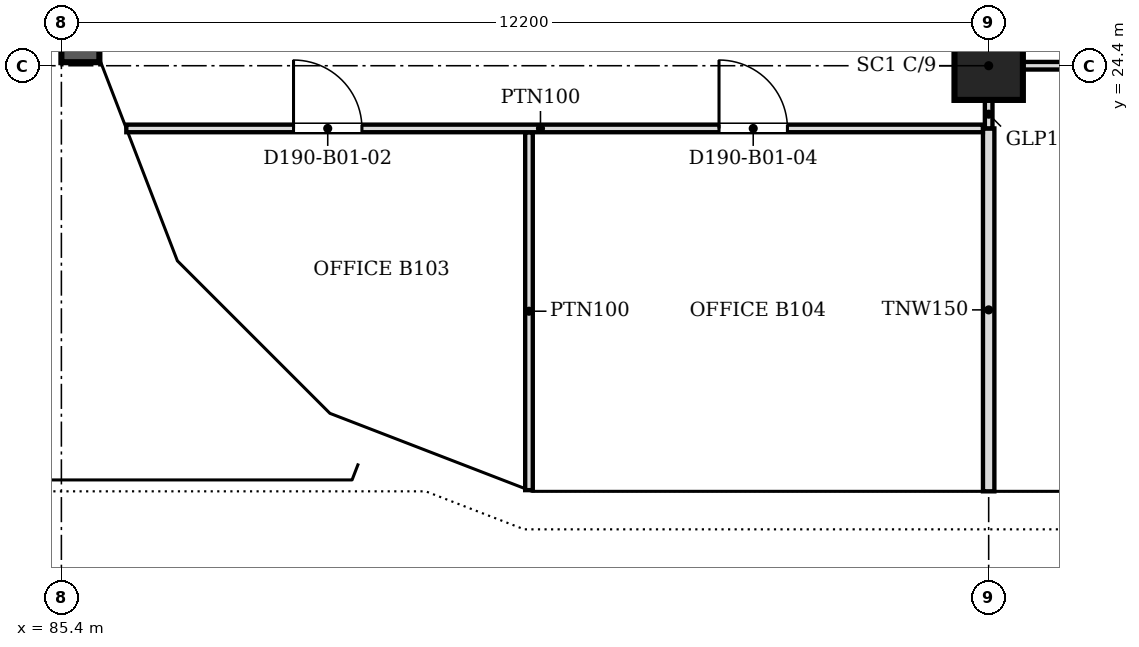
"""IFC4 building model, lengths in metres.
Left out: names, types, materials, properties, quantities, classifications, styles, units other than length and angle.
Written with IfcOpenShell. Run it as: python <this file> out.ifc"""

import sys

from ifc_helpers import new_model, si_unit, direction, frame, frame_2d, origin, origin_2d, place, context, subcontext, project, spatial, polyline, rectangle, outline, extrude, faceted_brep, source, transform, mapped, element, fill, save


model = new_model("IFC4")
c1 = context("Model", 3, precision=1e-05, world=origin(), true_north=direction((0.0, 1.0)))
c2 = subcontext(c1, "Body", "Model", "MODEL_VIEW")
j1 = project(units=[si_unit("LENGTHUNIT", "METRE"), si_unit("PLANEANGLEUNIT", "RADIAN")], contexts=[c1])
p1 = place(None, origin())
s1 = spatial("IfcSite", under=j1, at=p1, CompositionType="ELEMENT")
p2 = place(p1, origin())
s2 = spatial("IfcBuilding", under=s1, at=p2, CompositionType="ELEMENT")
p3 = place(p2, frame((0.0, 0.0, 16.8)))
s3 = spatial("IfcBuildingStorey", under=s2, at=p3, CompositionType="ELEMENT", Elevation=16.8)
p4 = place(p3, frame((97.6, 24.4, 0.0), z_axis=(0.0, 0.0, 1.0), x_axis=(1.0, 0.0, 0.0)))
e1 = element("IfcColumn", 1, at=p4, inside=s3, PredefinedType="COLUMN", context=c2, shape_type="SweptSolid", body=[
    extrude(rectangle(XDim=0.9, YDim=0.9, at=origin_2d()), origin(), (0.0, 0.0, 1.0), 4.3),
])
m1 = source(origin(), c2, "Body", "Brep", [
    faceted_brep([(3.05, -0.25, 0.0), (0.047, -0.25, 4.5), (0.0, -0.25, 4.429), (0.0, -0.25, 0.0), (0.093, 0.25, 4.43), (3.05, 0.25, 0.0), (0.093, 0.25, 0.0), (0.047, 0.0, 4.5)], [[[0, 1, 2, 3]], [[4, 5, 6]], [[5, 4, 7, 1, 0]], [[2, 1, 7]], [[6, 5, 0, 3]], [[6, 3, 2, 7, 4]]]),
])
p5 = place(p3, frame((91.5, 18.55, 0.0), z_axis=(0.0, 0.0, 1.0), x_axis=(1.0, 0.0, 0.0)))
e2 = element("IfcWall", 2, at=p5, inside=s3, PredefinedType="SOLIDWALL", context=c2, shape_type="MappedRepresentation", body=[
    mapped(m1, transform((0.0, 0.0, 0.0), scale=1.0)),
])
m2 = source(origin(), c2, "Body", "SweptSolid", [
    extrude(outline(polyline([(2.583, 0.25), (0.247, 3.75), (0.247, 0.25), (2.583, 0.25)])), frame((0.0, 0.26, 0.0), z_axis=(0.0, -1.0, 0.0), x_axis=(1.0, 0.0, 0.0)), (0.0, 0.0, 1.0), 0.52),
])
p6 = place(p5, origin())
e3 = element("IfcOpeningElement", 3, at=p6, cuts=e2, PredefinedType="OPENING", context=c2, shape_type="MappedRepresentation", body=[
    mapped(m2, transform((0.0, 0.0, 0.0), scale=1.0)),
])
m3 = source(origin(), c2, "Body", "Brep", [
    faceted_brep([(2.997, -0.25, 4.43), (2.95, -0.25, 4.5), (0.0, -0.25, 0.0), (2.997, -0.25, 0.0), (0.053, 0.25, 0.081), (2.904, 0.25, 4.429), (2.904, 0.25, 0.0), (0.053, 0.25, 0.0), (2.95, 0.0, 4.5), (0.0, 0.0, 0.0)], [[[0, 1, 2, 3]], [[4, 5, 6, 7]], [[8, 1, 0]], [[5, 4, 9, 2, 1, 8]], [[7, 6, 3, 2, 9]], [[7, 9, 4]], [[3, 6, 5, 8, 0]]]),
])
p7 = place(p3, frame((88.794, 19.612, 0.0), z_axis=(0.0, 0.0, 1.0), x_axis=(0.933000876937, -0.359874094142, 0.0)))
e4 = element("IfcWall", 4, at=p7, inside=s3, PredefinedType="SOLIDWALL", context=c2, shape_type="MappedRepresentation", body=[
    mapped(m3, transform((0.0, 0.0, 0.0), scale=1.0)),
])
m4 = source(origin(), c2, "Body", "SweptSolid", [
    extrude(outline(polyline([(2.75, 3.739), (0.463, 0.25), (2.75, 0.25), (2.75, 3.739)])), frame((0.0, 0.26, 0.0), z_axis=(0.0, -1.0, 0.0), x_axis=(1.0, 0.0, 0.0)), (0.0, 0.0, 1.0), 0.52),
])
p8 = place(p7, origin())
e5 = element("IfcOpeningElement", 5, at=p8, cuts=e4, PredefinedType="OPENING", context=c2, shape_type="MappedRepresentation", body=[
    mapped(m4, transform((0.0, 0.0, 0.0), scale=1.0)),
])
m5 = source(origin(), c2, "Body", "Brep", [
    faceted_brep([(6.1, -0.25, 0.0), (3.05, -0.25, 4.5), (0.0, -0.25, 0.0), (6.1, -0.25, 0.0), (0.0, 0.25, 0.0), (3.05, 0.25, 4.5), (6.1, 0.25, 0.0), (6.1, 0.25, 0.0)], [[[0, 1, 2, 3]], [[4, 5, 6, 7]], [[6, 5, 1, 0]], [[5, 4, 2, 1]], [[4, 7, 3, 2]], [[3, 7, 6, 0]]]),
])
p9 = place(p3, frame((94.55, 18.55, 0.0), z_axis=(0.0, 0.0, 1.0), x_axis=(1.0, 0.0, 0.0)))
e6 = element("IfcWall", 6, at=p9, inside=s3, PredefinedType="SOLIDWALL", context=c2, shape_type="MappedRepresentation", body=[
    mapped(m5, transform((0.0, 0.0, 0.0), scale=1.0)),
])
m6 = source(origin(), c2, "Body", "SweptSolid", [
    extrude(outline(polyline([(5.629, 0.25), (3.05, 4.054), (0.471, 0.25), (5.629, 0.25)])), frame((0.0, 0.26, 0.0), z_axis=(0.0, -1.0, 0.0), x_axis=(1.0, 0.0, 0.0)), (0.0, 0.0, 1.0), 0.52),
])
p10 = place(p9, origin())
e7 = element("IfcOpeningElement", 7, at=p10, cuts=e6, PredefinedType="OPENING", context=c2, shape_type="MappedRepresentation", body=[
    mapped(m6, transform((0.0, 0.0, 0.0), scale=1.0)),
])
m7 = source(origin(), c2, "Body", "Brep", [
    faceted_brep([(6.053, -0.25, 0.0), (3.05, -0.25, 4.5), (0.0, -0.25, 0.0), (0.0, 0.25, 0.0), (3.05, 0.25, 4.5), (6.007, 0.25, 0.07), (6.007, 0.25, 0.0), (6.053, 0.0, 0.0)], [[[0, 1, 2]], [[3, 4, 5, 6]], [[5, 4, 1, 0, 7]], [[4, 3, 2, 1]], [[3, 6, 7, 0, 2]], [[7, 6, 5]]]),
])
p11 = place(p3, frame((85.65, 30.5, 0.0), z_axis=(0.0, 0.0, 1.0), x_axis=(0.0, -1.0, 0.0)))
e8 = element("IfcWall", 8, at=p11, inside=s3, PredefinedType="SOLIDWALL", context=c2, shape_type="MappedRepresentation", body=[
    mapped(m7, transform((0.0, 0.0, 0.0), scale=1.0)),
])
m8 = source(origin(), c2, "Body", "SweptSolid", [
    extrude(rectangle(XDim=1.8, YDim=2.4, at=frame_2d((0.9, 1.2))), frame((0.0, 0.26, 0.0), z_axis=(0.0, -1.0, 0.0), x_axis=(1.0, 0.0, 0.0)), (0.0, 0.0, 1.0), 0.52),
])
p12 = place(p11, frame((2.15, 0.0, 0.0)))
e9 = element("IfcOpeningElement", 9, at=p12, cuts=e8, PredefinedType="OPENING", context=c2, shape_type="MappedRepresentation", body=[
    mapped(m8, transform((0.0, 0.0, 0.0), scale=1.0)),
])
m9 = source(origin(), c2, "Body", "Brep", [
    faceted_brep([(3.003, -0.25, 4.419), (2.95, -0.25, 4.5), (0.0, -0.25, 0.0), (3.003, -0.25, 0.0), (0.047, 0.25, 0.071), (2.898, 0.25, 4.419), (2.898, 0.25, 0.0), (0.047, 0.25, 0.0), (2.95, 0.0, 4.5), (0.0, 0.0, 0.0)], [[[0, 1, 2, 3]], [[4, 5, 6, 7]], [[8, 1, 0]], [[5, 4, 9, 2, 1, 8]], [[7, 6, 3, 2, 9]], [[7, 9, 4]], [[3, 6, 5, 8, 0]]]),
])
p13 = place(p3, frame((85.65, 24.447, 0.0), z_axis=(0.0, 0.0, 1.0), x_axis=(0.35992665181, -0.932980602862, 0.0)))
e10 = element("IfcWall", 10, at=p13, inside=s3, PredefinedType="SOLIDWALL", context=c2, shape_type="MappedRepresentation", body=[
    mapped(m9, transform((0.0, 0.0, 0.0), scale=1.0)),
])
p14 = place(p13, origin())
e11 = element("IfcOpeningElement", 11, at=p14, cuts=e10, PredefinedType="OPENING", context=c2, shape_type="MappedRepresentation", body=[
    mapped(m4, transform((0.0, 0.0, 0.0), scale=1.0)),
])
m10 = source(origin(), c2, "Body", "Brep", [
    faceted_brep([(2.997, -0.25, 0.0), (0.053, -0.25, 4.5), (0.0, -0.25, 4.419), (0.0, -0.25, 0.0), (0.106, 0.25, 4.419), (2.944, 0.25, 0.081), (2.944, 0.25, 0.0), (0.106, 0.25, 0.0), (0.053, 0.0, 4.5), (2.997, 0.0, 0.0)], [[[0, 1, 2, 3]], [[4, 5, 6, 7]], [[5, 4, 8, 1, 0, 9]], [[2, 1, 8]], [[7, 6, 9, 0, 3]], [[7, 3, 2, 8, 4]], [[9, 6, 5]]]),
])
p15 = place(p3, frame((86.675, 21.731, 0.0), z_axis=(0.0, 0.0, 1.0), x_axis=(0.707106781187, -0.707106781187, 0.0)))
e12 = element("IfcWall", 12, at=p15, inside=s3, PredefinedType="SOLIDWALL", context=c2, shape_type="MappedRepresentation", body=[
    mapped(m10, transform((0.0, 0.0, 0.0), scale=1.0)),
])
m11 = source(origin(), c2, "Body", "SweptSolid", [
    extrude(outline(polyline([(2.535, 0.25), (0.253, 3.738), (0.253, 0.25), (2.535, 0.25)])), frame((0.0, 0.26, 0.0), z_axis=(0.0, -1.0, 0.0), x_axis=(1.0, 0.0, 0.0)), (0.0, 0.0, 1.0), 0.52),
])
p16 = place(p15, origin())
e13 = element("IfcOpeningElement", 13, at=p16, cuts=e12, PredefinedType="OPENING", context=c2, shape_type="MappedRepresentation", body=[
    mapped(m11, transform((0.0, 0.0, 0.0), scale=1.0)),
])
p17 = place(p2, frame((0.0, 0.0, 21.3)))
s4 = spatial("IfcBuildingStorey", under=s2, at=p17, CompositionType="ELEMENT", Elevation=21.3)
m12 = source(origin(), c2, "Body", "Brep", [
    faceted_brep([(3.003, -0.25, 0.0), (6.053, -0.25, 4.5), (3.003, -0.25, 9.0), (0.0, -0.25, 4.5), (0.047, 0.25, 4.57), (3.003, 0.25, 9.0), (6.053, 0.25, 4.5), (3.003, 0.25, 0.0), (0.047, 0.25, 4.43), (0.0, 0.0, 4.5)], [[[0, 1, 2, 3]], [[4, 5, 6, 7, 8]], [[7, 6, 1, 0]], [[6, 5, 2, 1]], [[5, 4, 9, 3, 2]], [[8, 7, 0, 3, 9]], [[8, 9, 4]]]),
])
p18 = place(p17, frame((91.547, 18.55, -4.5), z_axis=(0.0, 0.0, 1.0), x_axis=(1.0, 0.0, 0.0)))
e14 = element("IfcWall", 14, at=p18, inside=s4, PredefinedType="SOLIDWALL", context=c2, shape_type="MappedRepresentation", body=[
    mapped(m12, transform((0.0, 0.0, 0.0), scale=1.0)),
])
m13 = source(origin(), c2, "Body", "SweptSolid", [
    extrude(outline(polyline([(3.005, 0.448), (5.751, 4.5), (3.005, 8.552), (0.301, 4.5), (3.005, 0.448)])), frame((0.0, 0.26, 0.0), z_axis=(0.0, -1.0, 0.0), x_axis=(1.0, 0.0, 0.0)), (0.0, 0.0, 1.0), 0.52),
])
p19 = place(p18, origin())
e15 = element("IfcOpeningElement", 15, at=p19, cuts=e14, PredefinedType="OPENING", context=c2, shape_type="MappedRepresentation", body=[
    mapped(m13, transform((0.0, 0.0, 0.0), scale=1.0)),
])
m14 = source(origin(), c2, "Body", "Brep", [
    faceted_brep([(3.05, -0.25, 0.0), (6.1, -0.25, 4.5), (6.1, -0.25, 4.5), (3.05, -0.25, 9.0), (0.0, -0.25, 4.5), (0.0, 0.25, 4.5), (3.05, 0.25, 9.0), (6.1, 0.25, 4.5), (6.1, 0.25, 4.5), (3.05, 0.25, 0.0)], [[[0, 1, 2, 3, 4]], [[5, 6, 7, 8, 9]], [[9, 8, 1, 0]], [[7, 6, 3, 2]], [[6, 5, 4, 3]], [[5, 9, 0, 4]], [[1, 8, 7, 2]]]),
])
p20 = place(p17, frame((97.6, 18.55, -4.5), z_axis=(0.0, 0.0, 1.0), x_axis=(1.0, 0.0, 0.0)))
e16 = element("IfcWall", 16, at=p20, inside=s4, PredefinedType="SOLIDWALL", context=c2, shape_type="MappedRepresentation", body=[
    mapped(m14, transform((0.0, 0.0, 0.0), scale=1.0)),
])
m15 = source(origin(), c2, "Body", "SweptSolid", [
    extrude(outline(polyline([(3.05, 0.446), (5.798, 4.5), (3.05, 8.554), (0.302, 4.5), (3.05, 0.446)])), frame((0.0, 0.26, 0.0), z_axis=(0.0, -1.0, 0.0), x_axis=(1.0, 0.0, 0.0)), (0.0, 0.0, 1.0), 0.52),
])
p21 = place(p20, origin())
e17 = element("IfcOpeningElement", 17, at=p21, cuts=e16, PredefinedType="OPENING", context=c2, shape_type="MappedRepresentation", body=[
    mapped(m15, transform((0.0, 0.0, 0.0), scale=1.0)),
])
m16 = source(origin(), c2, "Body", "Brep", [
    faceted_brep([(1.753, -0.25, 0.0), (1.8, -0.25, 0.071), (1.8, -0.25, 8.929), (1.753, -0.25, 9.0), (0.0, -0.25, 6.373), (0.0, -0.25, 2.627), (0.0, 0.25, 2.627), (0.0, 0.25, 6.373), (1.707, 0.25, 8.93), (1.707, 0.25, 0.07), (1.753, 0.0, 0.0), (1.753, 0.0, 9.0)], [[[0, 1, 2, 3, 4, 5]], [[6, 7, 8, 9]], [[1, 0, 10]], [[11, 3, 2]], [[8, 7, 4, 3, 11]], [[7, 6, 5, 4]], [[6, 9, 10, 0, 5]], [[1, 10, 9, 8, 11, 2]]]),
])
p22 = place(p17, frame((85.65, 26.2, -4.5), z_axis=(0.0, 0.0, 1.0), x_axis=(0.0, -1.0, 0.0)))
e18 = element("IfcWall", 18, at=p22, inside=s4, PredefinedType="SOLIDWALL", context=c2, shape_type="MappedRepresentation", body=[
    mapped(m16, transform((0.0, 0.0, 0.0), scale=1.0)),
])
m17 = source(origin(), c2, "Body", "SweptSolid", [
    extrude(outline(polyline([(1.553, 8.25), (0.0, 5.922), (0.0, 3.077), (1.553, 0.75), (1.553, 8.25)])), frame((0.0, 0.26, 0.0), z_axis=(0.0, -1.0, 0.0), x_axis=(1.0, 0.0, 0.0)), (0.0, 0.0, 1.0), 0.52),
])
p23 = place(p22, origin())
e19 = element("IfcOpeningElement", 19, at=p23, cuts=e18, PredefinedType="OPENING", context=c2, shape_type="MappedRepresentation", body=[
    mapped(m17, transform((0.0, 0.0, 0.0), scale=1.0)),
])
m18 = source(origin(), c2, "Body", "Brep", [
    faceted_brep([(0.047, -0.25, 0.0), (2.997, -0.25, 4.5), (0.047, -0.25, 9.0), (0.0, -0.25, 8.93), (0.0, -0.25, 0.07), (0.093, 0.25, 8.929), (2.944, 0.25, 4.581), (2.944, 0.25, 4.419), (0.093, 0.25, 0.071), (2.997, 0.0, 4.5), (0.047, 0.0, 0.0), (0.047, 0.0, 9.0)], [[[0, 1, 2, 3, 4]], [[5, 6, 7, 8]], [[8, 7, 9, 1, 0, 10]], [[6, 5, 11, 2, 1, 9]], [[3, 2, 11]], [[10, 0, 4]], [[8, 10, 4, 3, 11, 5]], [[9, 7, 6]]]),
])
p24 = place(p17, frame((85.633, 24.49, -4.5), z_axis=(0.0, 0.0, 1.0), x_axis=(0.359901446078, -0.932990326376, 0.0)))
e20 = element("IfcWall", 20, at=p24, inside=s4, PredefinedType="SOLIDWALL", context=c2, shape_type="MappedRepresentation", body=[
    mapped(m18, transform((0.0, 0.0, 0.0), scale=1.0)),
])
m19 = source(origin(), c2, "Body", "SweptSolid", [
    extrude(outline(polyline([(0.247, 0.761), (2.698, 4.5), (0.247, 8.239), (0.247, 0.761)])), frame((0.0, 0.26, 0.0), z_axis=(0.0, -1.0, 0.0), x_axis=(1.0, 0.0, 0.0)), (0.0, 0.0, 1.0), 0.52),
])
p25 = place(p24, origin())
e21 = element("IfcOpeningElement", 21, at=p25, cuts=e20, PredefinedType="OPENING", context=c2, shape_type="MappedRepresentation", body=[
    mapped(m19, transform((0.0, 0.0, 0.0), scale=1.0)),
])
m20 = source(origin(), c2, "Body", "Brep", [
    faceted_brep([(2.944, -0.25, 0.0), (2.997, -0.25, 0.081), (2.997, -0.25, 8.919), (2.944, -0.25, 9.0), (0.0, -0.25, 4.5), (0.053, 0.25, 4.581), (2.891, 0.25, 8.919), (2.891, 0.25, 0.081), (0.053, 0.25, 4.419), (2.944, 0.0, 0.0), (2.944, 0.0, 9.0), (0.0, 0.0, 4.5)], [[[0, 1, 2, 3, 4]], [[5, 6, 7, 8]], [[1, 0, 9]], [[10, 3, 2]], [[6, 5, 11, 4, 3, 10]], [[8, 7, 9, 0, 4, 11]], [[8, 11, 5]], [[1, 9, 7, 6, 10, 2]]]),
])
p26 = place(p17, frame((86.712, 21.694, -4.5), z_axis=(0.0, 0.0, 1.0), x_axis=(0.707066050402, -0.707147509625, 0.0)))
e22 = element("IfcWall", 22, at=p26, inside=s4, PredefinedType="SOLIDWALL", context=c2, shape_type="MappedRepresentation", body=[
    mapped(m20, transform((0.0, 0.0, 0.0), scale=1.0)),
])
m21 = source(origin(), c2, "Body", "SweptSolid", [
    extrude(outline(polyline([(2.744, 8.238), (0.299, 4.5), (2.744, 0.762), (2.744, 8.238)])), frame((0.0, 0.26, 0.0), z_axis=(0.0, -1.0, 0.0), x_axis=(1.0, 0.0, 0.0)), (0.0, 0.0, 1.0), 0.52),
])
p27 = place(p26, origin())
e23 = element("IfcOpeningElement", 23, at=p27, cuts=e22, PredefinedType="OPENING", context=c2, shape_type="MappedRepresentation", body=[
    mapped(m21, transform((0.0, 0.0, 0.0), scale=1.0)),
])
m22 = source(origin(), c2, "Body", "Brep", [
    faceted_brep([(0.053, -0.25, 0.0), (3.003, -0.25, 4.5), (0.053, -0.25, 9.0), (0.0, -0.25, 8.919), (0.0, -0.25, 0.081), (0.106, 0.25, 8.919), (2.957, 0.25, 4.571), (2.957, 0.25, 4.429), (0.106, 0.25, 0.081), (3.003, 0.0, 4.5), (0.053, 0.0, 0.0), (0.053, 0.0, 9.0)], [[[0, 1, 2, 3, 4]], [[5, 6, 7, 8]], [[8, 7, 9, 1, 0, 10]], [[6, 5, 11, 2, 1, 9]], [[3, 2, 11]], [[10, 0, 4]], [[8, 10, 4, 3, 11, 5]], [[9, 7, 6]]]),
])
p28 = place(p17, frame((88.744, 19.631, -4.5), z_axis=(0.0, 0.0, 1.0), x_axis=(0.932997369089, -0.359883188373, 0.0)))
e24 = element("IfcWall", 24, at=p28, inside=s4, PredefinedType="SOLIDWALL", context=c2, shape_type="MappedRepresentation", body=[
    mapped(m22, transform((0.0, 0.0, 0.0), scale=1.0)),
])
m23 = source(origin(), c2, "Body", "SweptSolid", [
    extrude(outline(polyline([(0.253, 0.761), (2.705, 4.5), (0.253, 8.239), (0.253, 0.761)])), frame((0.0, 0.26, 0.0), z_axis=(0.0, -1.0, 0.0), x_axis=(1.0, 0.0, 0.0)), (0.0, 0.0, 1.0), 0.52),
])
p29 = place(p28, origin())
e25 = element("IfcOpeningElement", 25, at=p29, cuts=e24, PredefinedType="OPENING", context=c2, shape_type="MappedRepresentation", body=[
    mapped(m23, transform((0.0, 0.0, 0.0), scale=1.0)),
])
p30 = place(p3, frame((97.6, 18.8, 0.0), z_axis=(0.0, 0.0, 1.0), x_axis=(0.0, 1.0, 0.0)))
e26 = element("IfcWall", 26, at=p30, inside=s3, PredefinedType="PARTITIONING", context=c2, shape_type="SweptSolid", body=[
    extrude(rectangle(XDim=4.775, YDim=0.15, at=frame_2d((2.387, 0.0))), origin(), (0.0, 0.0, 1.0), 3.415),
])
p31 = place(p3, frame((91.552, 18.816, 0.0), z_axis=(0.0, 0.0, 1.0), x_axis=(0.0, 1.0, 0.0)))
e27 = element("IfcWall", 27, at=p31, inside=s3, PredefinedType="PARTITIONING", context=c2, shape_type="SweptSolid", body=[
    extrude(rectangle(XDim=4.708, YDim=0.1, at=frame_2d((2.354, 0.0))), origin(), (0.0, 0.0, 1.0), 3.415),
])
p32 = place(p3, frame((97.524, 23.575, 0.0), z_axis=(0.0, 0.0, 1.0), x_axis=(-1.0, 0.0, 0.0)))
e28 = element("IfcWall", 28, at=p32, inside=s3, PredefinedType="PARTITIONING", context=c2, shape_type="SweptSolid", body=[
    extrude(rectangle(XDim=11.27, YDim=0.1, at=frame_2d((5.635, 0.0))), origin(), (0.0, 0.0, 1.0), 3.415),
])
m24 = source(origin(), c2, "Body", "SweptSolid", [
    extrude(rectangle(XDim=0.9, YDim=2.1, at=frame_2d((0.45, 1.05))), frame((0.0, 0.06, 0.0), z_axis=(0.0, -1.0, 0.0), x_axis=(1.0, 0.0, 0.0)), (0.0, 0.0, 1.0), 0.12),
])
p33 = place(p32, frame((8.17, 0.0, 0.0)))
e29 = element("IfcOpeningElement", 29, at=p33, cuts=e28, PredefinedType="OPENING", context=c2, shape_type="MappedRepresentation", body=[
    mapped(m24, transform((0.0, 0.0, 0.0), scale=1.0)),
])
p34 = place(p32, frame((2.572, 0.0, 0.0)))
e30 = element("IfcOpeningElement", 30, at=p34, cuts=e28, PredefinedType="OPENING", context=c2, shape_type="MappedRepresentation", body=[
    mapped(m24, transform((0.0, 0.0, 0.0), scale=1.0)),
])
p35 = place(p3, frame((97.6, 23.576, 0.0), z_axis=(0.0, 0.0, 1.0), x_axis=(0.0, 1.0, 0.0)))
e31 = element("IfcWall", 31, at=p35, inside=s3, PredefinedType="PARTITIONING", context=c2, shape_type="SweptSolid", body=[
    extrude(rectangle(XDim=0.373, YDim=0.1, at=frame_2d((0.187, 0.0))), origin(), (0.0, 0.0, 1.0), 3.415),
])
p36 = place(p3, frame((103.443, 24.4, 0.0), z_axis=(0.0, 0.0, 1.0), x_axis=(-1.0, 0.0, 0.0)))
e32 = element("IfcWall", 32, at=p36, inside=s3, PredefinedType="PARTITIONING", context=c2, shape_type="SweptSolid", body=[
    extrude(rectangle(XDim=5.392, YDim=0.1, at=frame_2d((2.696, 0.0))), origin(), (0.0, 0.0, 1.0), 3.415),
])
p37 = place(p36, frame((2.292, 0.0, 0.0)))
e33 = element("IfcOpeningElement", 33, at=p37, cuts=e32, PredefinedType="OPENING", context=c2, shape_type="MappedRepresentation", body=[
    mapped(m24, transform((0.0, 0.0, 0.0), scale=1.0)),
])
m25 = source(origin(), c2, "Body", "SweptSolid", [
    extrude(rectangle(XDim=0.9, YDim=2.1, at=frame_2d((0.45, 1.05))), frame((0.0, 0.025, 0.0), z_axis=(0.0, -1.0, 0.0), x_axis=(1.0, 0.0, 0.0)), (0.0, 0.0, 1.0), 0.05),
])
p38 = place(p33, origin())
e34 = element("IfcDoor", 34, at=p38, inside=s3, OperationType="SINGLE_SWING_RIGHT", PredefinedType="DOOR", context=c2, shape_type="MappedRepresentation", body=[
    mapped(m25, transform((0.0, 0.0, 0.0), scale=1.0)),
])
fill(e29, e34)
p39 = place(p34, origin())
e35 = element("IfcDoor", 35, at=p39, inside=s3, OperationType="SINGLE_SWING_RIGHT", PredefinedType="DOOR", context=c2, shape_type="MappedRepresentation", body=[
    mapped(m25, transform((0.0, 0.0, 0.0), scale=1.0)),
])
fill(e30, e35)
save(model, sys.argv[1])
